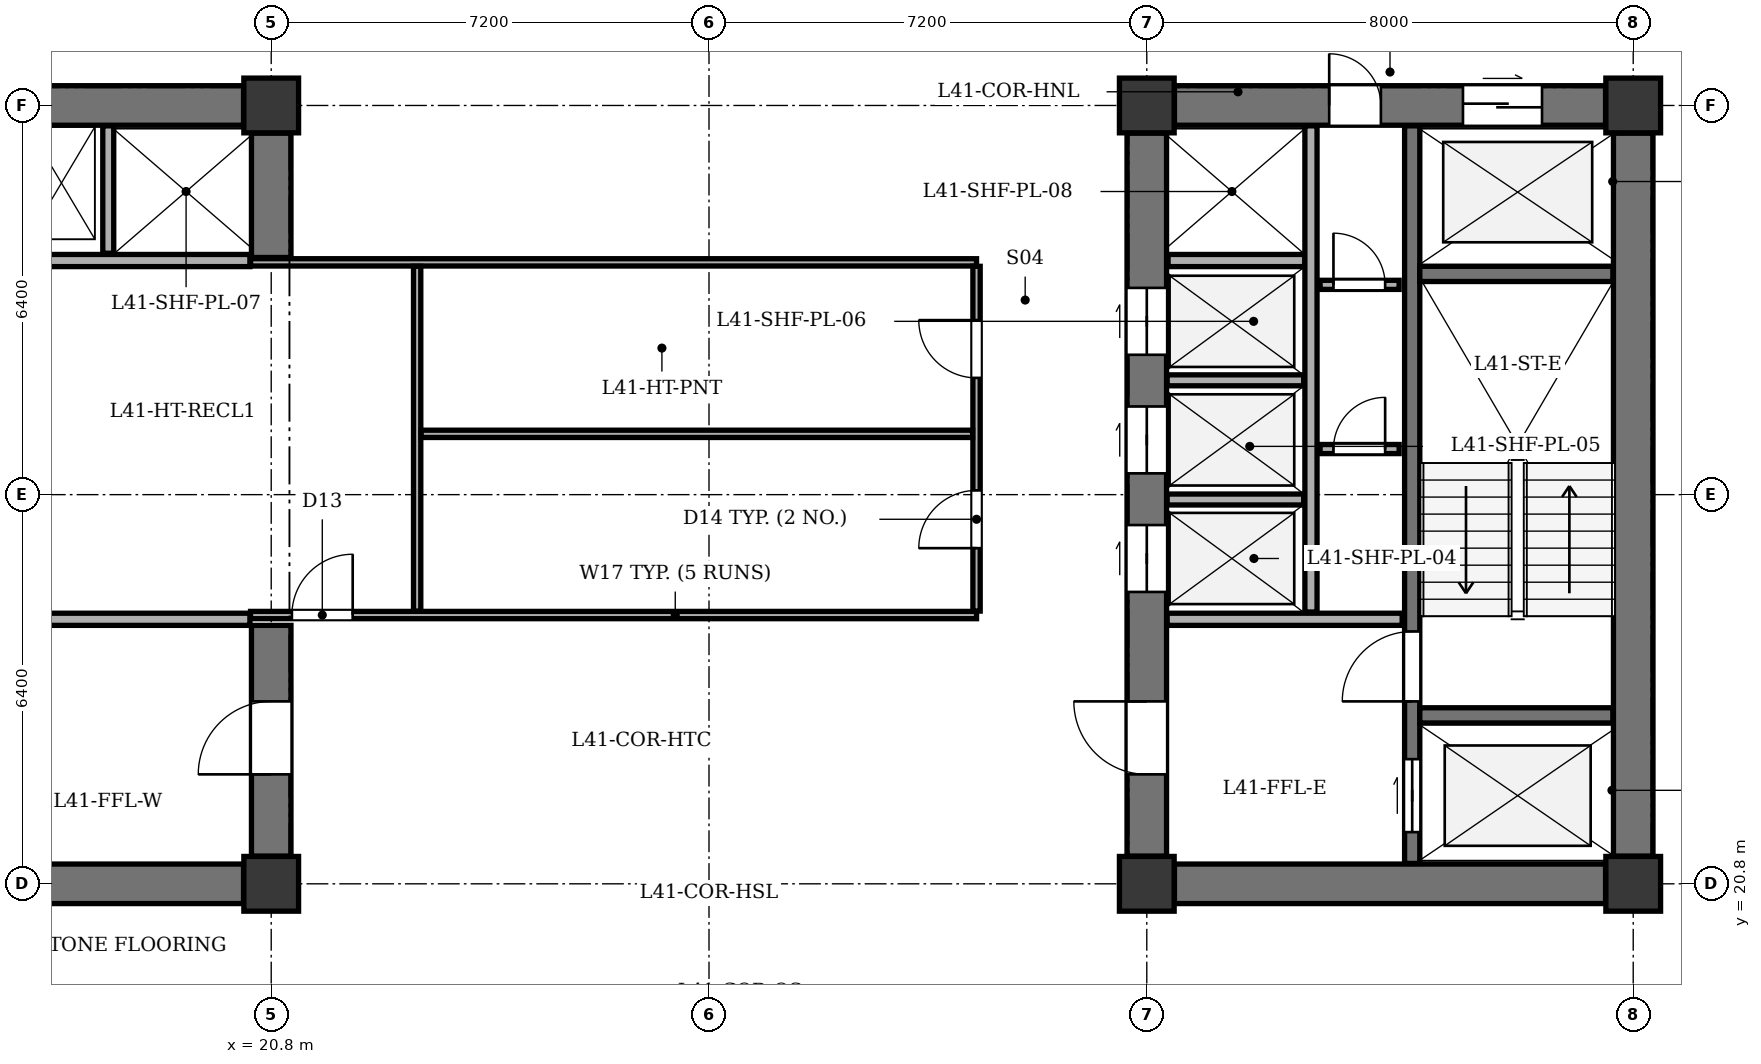
"""IFC4 building model, lengths in metres.
Left out: names, types, materials, properties, quantities, classifications, styles, units other than length and angle.
Written with IfcOpenShell. Run it as: python <this file> out.ifc"""

import sys

from ifc_helpers import new_model, si_unit, direction, frame, frame_2d, origin, origin_2d, place, context, subcontext, project, spatial, rectangle, extrude, element, fill, save


model = new_model("IFC4")
c1 = context("Model", 3, precision=1e-05, world=origin(), true_north=direction((0.0, 1.0)))
c2 = subcontext(c1, "Body", "Model", "MODEL_VIEW")
j1 = project(units=[si_unit("LENGTHUNIT", "METRE"), si_unit("PLANEANGLEUNIT", "RADIAN")], contexts=[c1])
p1 = place(None, origin())
s1 = spatial("IfcSite", under=j1, at=p1, CompositionType="ELEMENT")
p2 = place(p1, origin())
s2 = spatial("IfcBuilding", under=s1, at=p2, CompositionType="ELEMENT")
p3 = place(p2, frame((0.0, 0.0, 162.3)))
s3 = spatial("IfcBuildingStorey", under=s2, at=p3, CompositionType="ELEMENT", Elevation=162.3)
for number, where, z_axis, x_axis in (
    (1, (20.8, 20.8, 0.0), (0.0, 0.0, 1.0), (1.0, 0.0, 0.0)),
    (2, (20.8, 33.6, 0.0), (0.0, 0.0, 1.0), (1.0, 0.0, 0.0)),
    (3, (35.2, 20.8, 0.0), (0.0, 0.0, 1.0), (1.0, 0.0, 0.0)),
    (4, (43.2, 20.8, 0.0), (0.0, 0.0, 1.0), (1.0, 0.0, 0.0)),
    (5, (35.2, 33.6, 0.0), (0.0, 0.0, 1.0), (1.0, 0.0, 0.0)),
    (6, (43.2, 33.6, 0.0), (0.0, 0.0, 1.0), (1.0, 0.0, 0.0)),
):
    element("IfcColumn", number, at=place(p3, frame(where, z_axis=z_axis, x_axis=x_axis)), inside=s3, PredefinedType="COLUMN", context=c2, shape_type="SweptSolid", body=[
        extrude(rectangle(XDim=0.9, YDim=0.9, at=origin_2d()), origin(), (0.0, 0.0, 1.0), 3.5),
    ])
p4 = place(p3, frame((13.255, 20.8, 0.0), z_axis=(0.0, 0.0, 1.0), x_axis=(1.0, 0.0, 0.0)))
e7 = element("IfcWall", 7, at=p4, inside=s3, PredefinedType="SHEAR", context=c2, shape_type="SweptSolid", body=[
    extrude(rectangle(XDim=7.09, YDim=0.65, at=frame_2d((3.545, 0.0))), origin(), (0.0, 0.0, 1.0), 3.2),
])
p5 = place(p3, frame((13.255, 33.6, 0.0), z_axis=(0.0, 0.0, 1.0), x_axis=(1.0, 0.0, 0.0)))
e8 = element("IfcWall", 8, at=p5, inside=s3, PredefinedType="SHEAR", context=c2, shape_type="SweptSolid", body=[
    extrude(rectangle(XDim=7.09, YDim=0.65, at=frame_2d((3.545, 0.0))), origin(), (0.0, 0.0, 1.0), 3.2),
])
p6 = place(p5, frame((0.445, 0.0, 0.0)))
e9 = element("IfcOpeningElement", 9, at=p6, cuts=e8, PredefinedType="OPENING", context=c2, shape_type="SweptSolid", body=[
    extrude(rectangle(XDim=0.85, YDim=2.02, at=frame_2d((0.425, 1.01))), frame((0.0, 0.335, 0.0), z_axis=(0.0, -1.0, 0.0), x_axis=(1.0, 0.0, 0.0)), (0.0, 0.0, 1.0), 0.67),
])
p7 = place(p5, frame((1.745, 0.0, 0.0)))
e10 = element("IfcOpeningElement", 10, at=p7, cuts=e8, PredefinedType="OPENING", context=c2, shape_type="SweptSolid", body=[
    extrude(rectangle(XDim=0.85, YDim=2.02, at=frame_2d((0.425, 1.01))), frame((0.0, 0.335, 0.0), z_axis=(0.0, -1.0, 0.0), x_axis=(1.0, 0.0, 0.0)), (0.0, 0.0, 1.0), 0.67),
])
p8 = place(p3, frame((20.8, 21.255, 0.0), z_axis=(0.0, 0.0, 1.0), x_axis=(0.0, 1.0, 0.0)))
e11 = element("IfcWall", 11, at=p8, inside=s3, PredefinedType="SHEAR", context=c2, shape_type="SweptSolid", body=[
    extrude(rectangle(XDim=3.795, YDim=0.65, at=frame_2d((1.897, 0.0))), origin(), (0.0, 0.0, 1.0), 3.2),
])
p9 = place(p8, frame((1.345, 0.0, 0.0)))
e12 = element("IfcOpeningElement", 12, at=p9, cuts=e11, PredefinedType="OPENING", context=c2, shape_type="SweptSolid", body=[
    extrude(rectangle(XDim=1.2, YDim=2.15, at=frame_2d((0.6, 1.075))), frame((0.0, 0.335, 0.0), z_axis=(0.0, -1.0, 0.0), x_axis=(1.0, 0.0, 0.0)), (0.0, 0.0, 1.0), 0.67),
])
p10 = place(p3, frame((20.8, 31.1, 0.0), z_axis=(0.0, 0.0, 1.0), x_axis=(0.0, 1.0, 0.0)))
e13 = element("IfcWall", 13, at=p10, inside=s3, PredefinedType="SHEAR", context=c2, shape_type="SweptSolid", body=[
    extrude(rectangle(XDim=2.045, YDim=0.65, at=frame_2d((1.022, 0.0))), origin(), (0.0, 0.0, 1.0), 3.2),
])
for number, where, z_axis, x_axis in (
    (14, (16.6, 25.15, 0.0), (0.0, 0.0, 1.0), (1.0, 0.0, 0.0)),
    (15, (16.6, 31.05, 0.0), (0.0, 0.0, 1.0), (1.0, 0.0, 0.0)),
):
    element("IfcWall", number, at=place(p3, frame(where, z_axis=z_axis, x_axis=x_axis)), inside=s3, PredefinedType="SOLIDWALL", context=c2, shape_type="SweptSolid", body=[
        extrude(rectangle(XDim=3.85, YDim=0.2, at=frame_2d((1.925, 0.0))), origin(), (0.0, 0.0, 1.0), 3.2),
    ])
p11 = place(p3, frame((18.12, 31.17, 0.0), z_axis=(0.0, 0.0, 1.0), x_axis=(0.0, 1.0, 0.0)))
e16 = element("IfcWall", 16, at=p11, inside=s3, PredefinedType="PARTITIONING", context=c2, shape_type="SweptSolid", body=[
    extrude(rectangle(XDim=2.095, YDim=0.18, at=frame_2d((1.047, 0.0))), origin(), (0.0, 0.0, 1.0), 3.2),
])
p12 = place(p3, frame((43.2, 21.255, 0.0), z_axis=(0.0, 0.0, 1.0), x_axis=(0.0, 1.0, 0.0)))
e17 = element("IfcWall", 17, at=p12, inside=s3, PredefinedType="SHEAR", context=c2, shape_type="SweptSolid", body=[
    extrude(rectangle(XDim=11.89, YDim=0.65, at=frame_2d((5.945, 0.0))), origin(), (0.0, 0.0, 1.0), 3.2),
])
p13 = place(p3, frame((35.655, 20.8, 0.0), z_axis=(0.0, 0.0, 1.0), x_axis=(1.0, 0.0, 0.0)))
e18 = element("IfcWall", 18, at=p13, inside=s3, PredefinedType="SHEAR", context=c2, shape_type="SweptSolid", body=[
    extrude(rectangle(XDim=7.09, YDim=0.65, at=frame_2d((3.545, 0.0))), origin(), (0.0, 0.0, 1.0), 3.2),
])
p14 = place(p3, frame((35.655, 33.6, 0.0), z_axis=(0.0, 0.0, 1.0), x_axis=(1.0, 0.0, 0.0)))
e19 = element("IfcWall", 19, at=p14, inside=s3, PredefinedType="SHEAR", context=c2, shape_type="SweptSolid", body=[
    extrude(rectangle(XDim=7.09, YDim=0.65, at=frame_2d((3.545, 0.0))), origin(), (0.0, 0.0, 1.0), 3.2),
])
p15 = place(p14, frame((4.745, 0.0, 0.0)))
e20 = element("IfcOpeningElement", 20, at=p15, cuts=e19, PredefinedType="OPENING", context=c2, shape_type="SweptSolid", body=[
    extrude(rectangle(XDim=1.3, YDim=2.15, at=frame_2d((0.65, 1.075))), frame((0.0, 0.335, 0.0), z_axis=(0.0, -1.0, 0.0), x_axis=(1.0, 0.0, 0.0)), (0.0, 0.0, 1.0), 0.67),
])
p16 = place(p14, frame((2.545, 0.0, 0.0)))
e21 = element("IfcOpeningElement", 21, at=p16, cuts=e19, PredefinedType="OPENING", context=c2, shape_type="SweptSolid", body=[
    extrude(rectangle(XDim=0.85, YDim=2.02, at=frame_2d((0.425, 1.01))), frame((0.0, 0.335, 0.0), z_axis=(0.0, -1.0, 0.0), x_axis=(1.0, 0.0, 0.0)), (0.0, 0.0, 1.0), 0.67),
])
p17 = place(p3, frame((35.2, 21.255, 0.0), z_axis=(0.0, 0.0, 1.0), x_axis=(0.0, 1.0, 0.0)))
e22 = element("IfcWall", 22, at=p17, inside=s3, PredefinedType="SHEAR", context=c2, shape_type="SweptSolid", body=[
    extrude(rectangle(XDim=11.89, YDim=0.65, at=frame_2d((5.945, 0.0))), origin(), (0.0, 0.0, 1.0), 3.2),
])
p18 = place(p17, frame((1.345, 0.0, 0.0)))
e23 = element("IfcOpeningElement", 23, at=p18, cuts=e22, PredefinedType="OPENING", context=c2, shape_type="SweptSolid", body=[
    extrude(rectangle(XDim=1.2, YDim=2.15, at=frame_2d((0.6, 1.075))), frame((0.0, 0.335, 0.0), z_axis=(0.0, -1.0, 0.0), x_axis=(1.0, 0.0, 0.0)), (0.0, 0.0, 1.0), 0.67),
])
p19 = place(p17, frame((4.345, 0.0, 0.0)))
e24 = element("IfcOpeningElement", 24, at=p19, cuts=e22, PredefinedType="OPENING", context=c2, shape_type="SweptSolid", body=[
    extrude(rectangle(XDim=1.1, YDim=2.1, at=frame_2d((0.55, 1.05))), frame((0.0, 0.335, 0.0), z_axis=(0.0, -1.0, 0.0), x_axis=(1.0, 0.0, 0.0)), (0.0, 0.0, 1.0), 0.67),
])
p20 = place(p17, frame((6.295, 0.0, 0.0)))
e25 = element("IfcOpeningElement", 25, at=p20, cuts=e22, PredefinedType="OPENING", context=c2, shape_type="SweptSolid", body=[
    extrude(rectangle(XDim=1.1, YDim=2.1, at=frame_2d((0.55, 1.05))), frame((0.0, 0.335, 0.0), z_axis=(0.0, -1.0, 0.0), x_axis=(1.0, 0.0, 0.0)), (0.0, 0.0, 1.0), 0.67),
])
p21 = place(p17, frame((8.245, 0.0, 0.0)))
e26 = element("IfcOpeningElement", 26, at=p21, cuts=e22, PredefinedType="OPENING", context=c2, shape_type="SweptSolid", body=[
    extrude(rectangle(XDim=1.1, YDim=2.1, at=frame_2d((0.55, 1.05))), frame((0.0, 0.335, 0.0), z_axis=(0.0, -1.0, 0.0), x_axis=(1.0, 0.0, 0.0)), (0.0, 0.0, 1.0), 0.67),
])
p22 = place(p3, frame((39.565, 21.135, 0.0), z_axis=(0.0, 0.0, 1.0), x_axis=(0.0, 1.0, 0.0)))
e27 = element("IfcWall", 27, at=p22, inside=s3, PredefinedType="SHEAR", context=c2, shape_type="SweptSolid", body=[
    extrude(rectangle(XDim=12.13, YDim=0.25, at=frame_2d((6.065, 0.0))), origin(), (0.0, 0.0, 1.0), 3.2),
])
p23 = place(p22, frame((0.515, 0.0, 0.0)))
e28 = element("IfcOpeningElement", 28, at=p23, cuts=e27, PredefinedType="OPENING", context=c2, shape_type="SweptSolid", body=[
    extrude(rectangle(XDim=1.2, YDim=2.15, at=frame_2d((0.6, 1.075))), frame((0.0, 0.135, 0.0), z_axis=(0.0, -1.0, 0.0), x_axis=(1.0, 0.0, 0.0)), (0.0, 0.0, 1.0), 0.27),
])
p24 = place(p22, frame((2.665, 0.0, 0.0)))
e29 = element("IfcOpeningElement", 29, at=p24, cuts=e27, PredefinedType="OPENING", context=c2, shape_type="SweptSolid", body=[
    extrude(rectangle(XDim=1.15, YDim=2.15, at=frame_2d((0.575, 1.075))), frame((0.0, 0.135, 0.0), z_axis=(0.0, -1.0, 0.0), x_axis=(1.0, 0.0, 0.0)), (0.0, 0.0, 1.0), 0.27),
])
for number, where, z_axis, x_axis in (
    (30, (39.69, 23.57, 0.0), (0.0, 0.0, 1.0), (1.0, 0.0, 0.0)),
    (31, (39.69, 30.83, 0.0), (0.0, 0.0, 1.0), (1.0, 0.0, 0.0)),
):
    element("IfcWall", number, at=place(p3, frame(where, z_axis=z_axis, x_axis=x_axis)), inside=s3, PredefinedType="SHEAR", context=c2, shape_type="SweptSolid", body=[
        extrude(rectangle(XDim=3.175, YDim=0.25, at=frame_2d((1.587, 0.0))), origin(), (0.0, 0.0, 1.0), 3.2),
    ])
p25 = place(p3, frame((35.535, 25.15, 0.0), z_axis=(0.0, 0.0, 1.0), x_axis=(1.0, 0.0, 0.0)))
e32 = element("IfcWall", 32, at=p25, inside=s3, PredefinedType="SOLIDWALL", context=c2, shape_type="SweptSolid", body=[
    extrude(rectangle(XDim=3.865, YDim=0.2, at=frame_2d((1.933, 0.0))), origin(), (0.0, 0.0, 1.0), 3.2),
])
p26 = place(p3, frame((35.55, 31.05, 0.0), z_axis=(0.0, 0.0, 1.0), x_axis=(1.0, 0.0, 0.0)))
e33 = element("IfcWall", 33, at=p26, inside=s3, PredefinedType="SOLIDWALL", context=c2, shape_type="SweptSolid", body=[
    extrude(rectangle(XDim=2.25, YDim=0.2, at=frame_2d((1.125, 0.0))), origin(), (0.0, 0.0, 1.0), 3.2),
])
p27 = place(p3, frame((37.9, 25.27, 0.0), z_axis=(0.0, 0.0, 1.0), x_axis=(0.0, 1.0, 0.0)))
e34 = element("IfcWall", 34, at=p27, inside=s3, PredefinedType="SOLIDWALL", context=c2, shape_type="SweptSolid", body=[
    extrude(rectangle(XDim=7.995, YDim=0.2, at=frame_2d((3.998, 0.0))), origin(), (0.0, 0.0, 1.0), 3.2),
])
for number, where, z_axis, x_axis in (
    (35, (35.535, 27.12, 0.0), (0.0, 0.0, 1.0), (1.0, 0.0, 0.0)),
    (36, (35.535, 29.08, 0.0), (0.0, 0.0, 1.0), (1.0, 0.0, 0.0)),
):
    element("IfcWall", number, at=place(p3, frame(where, z_axis=z_axis, x_axis=x_axis)), inside=s3, PredefinedType="PARTITIONING", context=c2, shape_type="SweptSolid", body=[
        extrude(rectangle(XDim=2.245, YDim=0.18, at=frame_2d((1.123, 0.0))), origin(), (0.0, 0.0, 1.0), 3.2),
    ])
p28 = place(p3, frame((38.05, 27.95, 0.0), z_axis=(0.0, 0.0, 1.0), x_axis=(1.0, 0.0, 0.0)))
e37 = element("IfcWall", 37, at=p28, inside=s3, PredefinedType="PARTITIONING", context=c2, shape_type="SweptSolid", body=[
    extrude(rectangle(XDim=1.3, YDim=0.15, at=frame_2d((0.65, 0.0))), origin(), (0.0, 0.0, 1.0), 3.2),
])
p29 = place(p28, frame((0.22, 0.0, 0.0)))
e38 = element("IfcOpeningElement", 38, at=p29, cuts=e37, PredefinedType="OPENING", context=c2, shape_type="SweptSolid", body=[
    extrude(rectangle(XDim=0.85, YDim=2.02, at=frame_2d((0.425, 1.01))), frame((0.0, 0.085, 0.0), z_axis=(0.0, -1.0, 0.0), x_axis=(1.0, 0.0, 0.0)), (0.0, 0.0, 1.0), 0.17),
])
p30 = place(p3, frame((38.05, 30.65, 0.0), z_axis=(0.0, 0.0, 1.0), x_axis=(1.0, 0.0, 0.0)))
e39 = element("IfcWall", 39, at=p30, inside=s3, PredefinedType="PARTITIONING", context=c2, shape_type="SweptSolid", body=[
    extrude(rectangle(XDim=1.3, YDim=0.15, at=frame_2d((0.65, 0.0))), origin(), (0.0, 0.0, 1.0), 3.2),
])
p31 = place(p30, frame((0.22, 0.0, 0.0)))
e40 = element("IfcOpeningElement", 40, at=p31, cuts=e39, PredefinedType="OPENING", context=c2, shape_type="SweptSolid", body=[
    extrude(rectangle(XDim=0.85, YDim=2.02, at=frame_2d((0.425, 1.01))), frame((0.0, 0.085, 0.0), z_axis=(0.0, -1.0, 0.0), x_axis=(1.0, 0.0, 0.0)), (0.0, 0.0, 1.0), 0.17),
])
p32 = place(p3, frame((20.46, 25.22, 0.0), z_axis=(0.0, 0.0, 1.0), x_axis=(1.0, 0.0, 0.0)))
e41 = element("IfcWall", 41, at=p32, inside=s3, PredefinedType="PARTITIONING", context=c2, shape_type="SweptSolid", body=[
    extrude(rectangle(XDim=11.94, YDim=0.12, at=frame_2d((5.97, 0.0))), origin(), (0.0, 0.0, 1.0), 3.2),
])
p33 = place(p32, frame((0.68, 0.0, 0.0)))
e42 = element("IfcOpeningElement", 42, at=p33, cuts=e41, PredefinedType="OPENING", context=c2, shape_type="SweptSolid", body=[
    extrude(rectangle(XDim=1.0, YDim=2.1, at=frame_2d((0.5, 1.05))), frame((0.0, 0.07, 0.0), z_axis=(0.0, -1.0, 0.0), x_axis=(1.0, 0.0, 0.0)), (0.0, 0.0, 1.0), 0.14),
])
p34 = place(p3, frame((20.46, 31.02, 0.0), z_axis=(0.0, 0.0, 1.0), x_axis=(1.0, 0.0, 0.0)))
e43 = element("IfcWall", 43, at=p34, inside=s3, PredefinedType="PARTITIONING", context=c2, shape_type="SweptSolid", body=[
    extrude(rectangle(XDim=11.94, YDim=0.12, at=frame_2d((5.97, 0.0))), origin(), (0.0, 0.0, 1.0), 3.2),
])
p35 = place(p3, frame((32.4, 25.285, 0.0), z_axis=(0.0, 0.0, 1.0), x_axis=(0.0, 1.0, 0.0)))
e44 = element("IfcWall", 44, at=p35, inside=s3, PredefinedType="PARTITIONING", context=c2, shape_type="SweptSolid", body=[
    extrude(rectangle(XDim=5.67, YDim=0.12, at=frame_2d((2.835, 0.0))), origin(), (0.0, 0.0, 1.0), 3.2),
])
p36 = place(p35, frame((1.035, 0.0, 0.0)))
e45 = element("IfcOpeningElement", 45, at=p36, cuts=e44, PredefinedType="OPENING", context=c2, shape_type="SweptSolid", body=[
    extrude(rectangle(XDim=0.95, YDim=2.1, at=frame_2d((0.475, 1.05))), frame((0.0, 0.07, 0.0), z_axis=(0.0, -1.0, 0.0), x_axis=(1.0, 0.0, 0.0)), (0.0, 0.0, 1.0), 0.14),
])
p37 = place(p35, frame((3.835, 0.0, 0.0)))
e46 = element("IfcOpeningElement", 46, at=p37, cuts=e44, PredefinedType="OPENING", context=c2, shape_type="SweptSolid", body=[
    extrude(rectangle(XDim=0.95, YDim=2.1, at=frame_2d((0.475, 1.05))), frame((0.0, 0.07, 0.0), z_axis=(0.0, -1.0, 0.0), x_axis=(1.0, 0.0, 0.0)), (0.0, 0.0, 1.0), 0.14),
])
p38 = place(p3, frame((23.2, 25.285, 0.0), z_axis=(0.0, 0.0, 1.0), x_axis=(0.0, 1.0, 0.0)))
e47 = element("IfcWall", 47, at=p38, inside=s3, PredefinedType="PARTITIONING", context=c2, shape_type="SweptSolid", body=[
    extrude(rectangle(XDim=5.67, YDim=0.12, at=frame_2d((2.835, 0.0))), origin(), (0.0, 0.0, 1.0), 3.2),
])
p39 = place(p3, frame((23.265, 28.2, 0.0), z_axis=(0.0, 0.0, 1.0), x_axis=(1.0, 0.0, 0.0)))
e48 = element("IfcWall", 48, at=p39, inside=s3, PredefinedType="PARTITIONING", context=c2, shape_type="SweptSolid", body=[
    extrude(rectangle(XDim=9.07, YDim=0.12, at=frame_2d((4.535, 0.0))), origin(), (0.0, 0.0, 1.0), 3.2),
])
p40 = place(p9, origin())
e49 = element("IfcDoor", 49, at=p40, inside=s3, OperationType="SINGLE_SWING_LEFT", PredefinedType="DOOR", context=c2, shape_type="SweptSolid", body=[
    extrude(rectangle(XDim=1.2, YDim=2.15, at=frame_2d((0.6, 1.075))), frame((0.0, 0.025, 0.0), z_axis=(0.0, -1.0, 0.0), x_axis=(1.0, 0.0, 0.0)), (0.0, 0.0, 1.0), 0.05),
])
fill(e12, e49)
p41 = place(p15, origin())
e50 = element("IfcDoor", 50, at=p41, inside=s3, OperationType="DOUBLE_DOOR_SLIDING", PredefinedType="DOOR", context=c2, shape_type="SweptSolid", body=[
    extrude(rectangle(XDim=1.3, YDim=2.15, at=frame_2d((0.65, 1.075))), frame((0.0, 0.025, 0.0), z_axis=(0.0, -1.0, 0.0), x_axis=(1.0, 0.0, 0.0)), (0.0, 0.0, 1.0), 0.05),
])
fill(e20, e50)
p42 = place(p16, origin())
e51 = element("IfcDoor", 51, at=p42, inside=s3, OperationType="SINGLE_SWING_LEFT", PredefinedType="DOOR", context=c2, shape_type="SweptSolid", body=[
    extrude(rectangle(XDim=0.85, YDim=2.02, at=frame_2d((0.425, 1.01))), frame((0.0, 0.025, 0.0), z_axis=(0.0, -1.0, 0.0), x_axis=(1.0, 0.0, 0.0)), (0.0, 0.0, 1.0), 0.05),
])
fill(e21, e51)
p43 = place(p18, origin())
e52 = element("IfcDoor", 52, at=p43, inside=s3, OperationType="SINGLE_SWING_RIGHT", PredefinedType="DOOR", context=c2, shape_type="SweptSolid", body=[
    extrude(rectangle(XDim=1.2, YDim=2.15, at=frame_2d((0.6, 1.075))), frame((0.0, 0.025, 0.0), z_axis=(0.0, -1.0, 0.0), x_axis=(1.0, 0.0, 0.0)), (0.0, 0.0, 1.0), 0.05),
])
fill(e23, e52)
p44 = place(p19, origin())
e53 = element("IfcDoor", 53, at=p44, inside=s3, OperationType="DOUBLE_DOOR_SLIDING", PredefinedType="DOOR", context=c2, shape_type="SweptSolid", body=[
    extrude(rectangle(XDim=1.1, YDim=2.1, at=frame_2d((0.55, 1.05))), frame((0.0, 0.025, 0.0), z_axis=(0.0, -1.0, 0.0), x_axis=(1.0, 0.0, 0.0)), (0.0, 0.0, 1.0), 0.05),
])
fill(e24, e53)
p45 = place(p20, origin())
e54 = element("IfcDoor", 54, at=p45, inside=s3, OperationType="DOUBLE_DOOR_SLIDING", PredefinedType="DOOR", context=c2, shape_type="SweptSolid", body=[
    extrude(rectangle(XDim=1.1, YDim=2.1, at=frame_2d((0.55, 1.05))), frame((0.0, 0.025, 0.0), z_axis=(0.0, -1.0, 0.0), x_axis=(1.0, 0.0, 0.0)), (0.0, 0.0, 1.0), 0.05),
])
fill(e25, e54)
p46 = place(p21, origin())
e55 = element("IfcDoor", 55, at=p46, inside=s3, OperationType="DOUBLE_DOOR_SLIDING", PredefinedType="DOOR", context=c2, shape_type="SweptSolid", body=[
    extrude(rectangle(XDim=1.1, YDim=2.1, at=frame_2d((0.55, 1.05))), frame((0.0, 0.025, 0.0), z_axis=(0.0, -1.0, 0.0), x_axis=(1.0, 0.0, 0.0)), (0.0, 0.0, 1.0), 0.05),
])
fill(e26, e55)
p47 = place(p23, origin())
e56 = element("IfcDoor", 56, at=p47, inside=s3, OperationType="DOUBLE_DOOR_SLIDING", PredefinedType="DOOR", context=c2, shape_type="SweptSolid", body=[
    extrude(rectangle(XDim=1.2, YDim=2.15, at=frame_2d((0.6, 1.075))), frame((0.0, 0.025, 0.0), z_axis=(0.0, -1.0, 0.0), x_axis=(1.0, 0.0, 0.0)), (0.0, 0.0, 1.0), 0.05),
])
fill(e28, e56)
p48 = place(p24, origin())
e57 = element("IfcDoor", 57, at=p48, inside=s3, OperationType="SINGLE_SWING_LEFT", PredefinedType="DOOR", context=c2, shape_type="SweptSolid", body=[
    extrude(rectangle(XDim=1.15, YDim=2.15, at=frame_2d((0.575, 1.075))), frame((0.0, 0.025, 0.0), z_axis=(0.0, -1.0, 0.0), x_axis=(1.0, 0.0, 0.0)), (0.0, 0.0, 1.0), 0.05),
])
fill(e29, e57)
p49 = place(p29, origin())
e58 = element("IfcDoor", 58, at=p49, inside=s3, OperationType="SINGLE_SWING_RIGHT", PredefinedType="DOOR", context=c2, shape_type="SweptSolid", body=[
    extrude(rectangle(XDim=0.85, YDim=2.02, at=frame_2d((0.425, 1.01))), frame((0.0, 0.025, 0.0), z_axis=(0.0, -1.0, 0.0), x_axis=(1.0, 0.0, 0.0)), (0.0, 0.0, 1.0), 0.05),
])
fill(e38, e58)
p50 = place(p31, origin())
e59 = element("IfcDoor", 59, at=p50, inside=s3, OperationType="SINGLE_SWING_LEFT", PredefinedType="DOOR", context=c2, shape_type="SweptSolid", body=[
    extrude(rectangle(XDim=0.85, YDim=2.02, at=frame_2d((0.425, 1.01))), frame((0.0, 0.025, 0.0), z_axis=(0.0, -1.0, 0.0), x_axis=(1.0, 0.0, 0.0)), (0.0, 0.0, 1.0), 0.05),
])
fill(e40, e59)
p51 = place(p33, origin())
e60 = element("IfcDoor", 60, at=p51, inside=s3, OperationType="SINGLE_SWING_RIGHT", PredefinedType="DOOR", context=c2, shape_type="SweptSolid", body=[
    extrude(rectangle(XDim=1.0, YDim=2.1, at=frame_2d((0.5, 1.05))), frame((0.0, 0.025, 0.0), z_axis=(0.0, -1.0, 0.0), x_axis=(1.0, 0.0, 0.0)), (0.0, 0.0, 1.0), 0.05),
])
fill(e42, e60)
p52 = place(p36, origin())
e61 = element("IfcDoor", 61, at=p52, inside=s3, OperationType="SINGLE_SWING_LEFT", PredefinedType="DOOR", context=c2, shape_type="SweptSolid", body=[
    extrude(rectangle(XDim=0.95, YDim=2.1, at=frame_2d((0.475, 1.05))), frame((0.0, 0.025, 0.0), z_axis=(0.0, -1.0, 0.0), x_axis=(1.0, 0.0, 0.0)), (0.0, 0.0, 1.0), 0.05),
])
fill(e45, e61)
p53 = place(p37, origin())
e62 = element("IfcDoor", 62, at=p53, inside=s3, OperationType="SINGLE_SWING_RIGHT", PredefinedType="DOOR", context=c2, shape_type="SweptSolid", body=[
    extrude(rectangle(XDim=0.95, YDim=2.1, at=frame_2d((0.475, 1.05))), frame((0.0, 0.025, 0.0), z_axis=(0.0, -1.0, 0.0), x_axis=(1.0, 0.0, 0.0)), (0.0, 0.0, 1.0), 0.05),
])
fill(e46, e62)
save(model, sys.argv[1])
